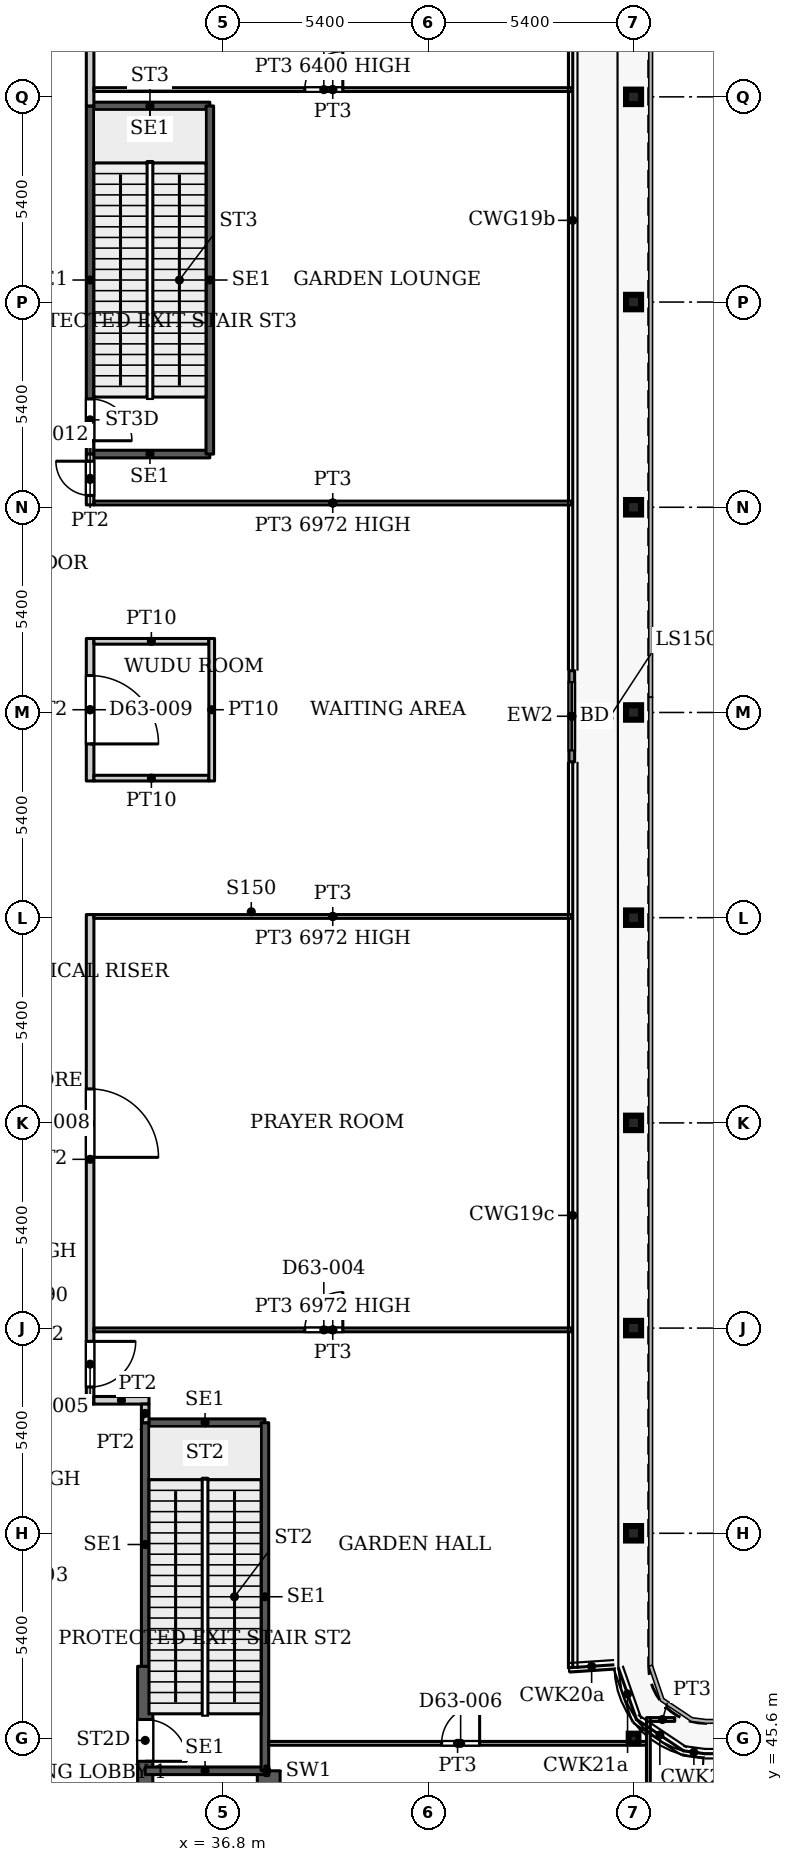
"""IFC4 building model, lengths in metres.
Left out: names, types, materials, properties, quantities, classifications, styles, units other than length and angle.
Written with IfcOpenShell. Run it as: python <this file> out.ifc"""

import sys

from ifc_helpers import new_model, si_unit, direction, frame, frame_2d, origin, origin_2d, place, context, subcontext, project, spatial, rectangle, hollow_rectangle, i_section, extrude, source, transform, mapped, element, fill, save


model = new_model("IFC4")
c1 = context("Model", 3, precision=1e-05, world=origin(), true_north=direction((0.0, 1.0)))
c2 = subcontext(c1, "Body", "Model", "MODEL_VIEW")
j1 = project(units=[si_unit("LENGTHUNIT", "METRE"), si_unit("PLANEANGLEUNIT", "RADIAN")], contexts=[c1])
p1 = place(None, origin())
s1 = spatial("IfcSite", under=j1, at=p1, CompositionType="ELEMENT")
p2 = place(p1, origin())
s2 = spatial("IfcBuilding", under=s1, at=p2, CompositionType="ELEMENT")
p3 = place(p2, frame((0.0, 0.0, 266.9)))
s3 = spatial("IfcBuildingStorey", under=s2, at=p3, CompositionType="ELEMENT", Elevation=266.9)
for number, where, z_axis, x_axis in (
    (1, (47.6, 51.0, 0.0), (0.0, 0.0, 1.0), (1.0, 0.0, 0.0)),
    (2, (47.6, 56.4, 0.0), (0.0, 0.0, 1.0), (1.0, 0.0, 0.0)),
    (3, (47.6, 61.8, 0.0), (0.0, 0.0, 1.0), (1.0, 0.0, 0.0)),
    (4, (47.6, 67.2, 0.0), (0.0, 0.0, 1.0), (1.0, 0.0, 0.0)),
    (5, (47.6, 72.6, 0.0), (0.0, 0.0, 1.0), (1.0, 0.0, 0.0)),
    (6, (47.6, 78.0, 0.0), (0.0, 0.0, 1.0), (1.0, 0.0, 0.0)),
    (7, (47.6, 83.4, 0.0), (0.0, 0.0, 1.0), (1.0, 0.0, 0.0)),
    (8, (47.6, 88.8, 0.0), (0.0, 0.0, 1.0), (1.0, 0.0, 0.0)),
):
    element("IfcColumn", number, at=place(p3, frame(where, z_axis=z_axis, x_axis=x_axis)), inside=s3, PredefinedType="COLUMN", context=c2, shape_type="SweptSolid", body=[
        extrude(i_section(OverallWidth=0.395, OverallDepth=0.38, WebThickness=0.019, FlangeThickness=0.03, FilletRadius=0.011, at=origin_2d()), origin(), (0.0, 0.0, 1.0), 7.8),
    ])
p4 = place(p3, frame((47.6, 45.6, 0.0), z_axis=(0.0, 0.0, 1.0), x_axis=(1.0, 0.0, 0.0)))
e9 = element("IfcColumn", 9, at=p4, inside=s3, PredefinedType="COLUMN", context=c2, shape_type="SweptSolid", body=[
    extrude(hollow_rectangle(XDim=0.254, YDim=0.254, WallThickness=0.013, InnerFilletRadius=0.013, OuterFilletRadius=0.025, at=origin_2d()), origin(), (0.0, 0.0, 1.0), 7.8),
])
p5 = place(p3, frame((34.75, 29.05, 0.0), z_axis=(0.0, 0.0, 1.0), x_axis=(0.0, 1.0, 0.0)))
e10 = element("IfcWall", 10, at=p5, inside=s3, PredefinedType="SHEAR", context=c2, shape_type="SweptSolid", body=[
    extrude(rectangle(XDim=18.45, YDim=0.4, at=frame_2d((9.225, 0.0))), origin(), (0.0, 0.0, 1.0), 7.8),
])
p6 = place(p5, frame((8.025, 0.0, 0.0)))
e11 = element("IfcOpeningElement", 11, at=p6, cuts=e10, PredefinedType="OPENING", context=c2, shape_type="SweptSolid", body=[
    extrude(rectangle(XDim=1.1, YDim=2.2, at=frame_2d((0.55, 1.1))), frame((0.0, 0.21, 0.0), z_axis=(0.0, -1.0, 0.0), x_axis=(1.0, 0.0, 0.0)), (0.0, 0.0, 1.0), 0.42),
])
p7 = place(p5, frame((10.875, 0.0, 0.0)))
e12 = element("IfcOpeningElement", 12, at=p7, cuts=e10, PredefinedType="OPENING", context=c2, shape_type="SweptSolid", body=[
    extrude(rectangle(XDim=1.1, YDim=2.2, at=frame_2d((0.55, 1.1))), frame((0.0, 0.21, 0.0), z_axis=(0.0, -1.0, 0.0), x_axis=(1.0, 0.0, 0.0)), (0.0, 0.0, 1.0), 0.42),
])
p8 = place(p5, frame((13.725, 0.0, 0.0)))
e13 = element("IfcOpeningElement", 13, at=p8, cuts=e10, PredefinedType="OPENING", context=c2, shape_type="SweptSolid", body=[
    extrude(rectangle(XDim=1.1, YDim=2.2, at=frame_2d((0.55, 1.1))), frame((0.0, 0.21, 0.0), z_axis=(0.0, -1.0, 0.0), x_axis=(1.0, 0.0, 0.0)), (0.0, 0.0, 1.0), 0.42),
])
p9 = place(p5, frame((15.95, 0.0, 0.0)))
e14 = element("IfcOpeningElement", 14, at=p9, cuts=e10, PredefinedType="OPENING", context=c2, shape_type="SweptSolid", body=[
    extrude(rectangle(XDim=1.1, YDim=2.2, at=frame_2d((0.55, 1.1))), frame((0.0, 0.21, 0.0), z_axis=(0.0, -1.0, 0.0), x_axis=(1.0, 0.0, 0.0)), (0.0, 0.0, 1.0), 0.42),
])
p10 = place(p3, frame((38.0, 36.2, 0.0), z_axis=(0.0, 0.0, 1.0), x_axis=(0.0, 1.0, 0.0)))
e15 = element("IfcWall", 15, at=p10, inside=s3, PredefinedType="SHEAR", context=c2, shape_type="SweptSolid", body=[
    extrude(rectangle(XDim=8.55, YDim=0.6, at=frame_2d((4.275, 0.0))), origin(), (0.0, 0.0, 1.0), 7.8),
])
p11 = place(p3, frame((45.975, 73.7, 0.0), z_axis=(0.0, 0.0, 1.0), x_axis=(0.0, -1.0, 0.0)))
e16 = element("IfcWall", 16, at=p11, inside=s3, PredefinedType="SOLIDWALL", context=c2, shape_type="SweptSolid", body=[
    extrude(rectangle(XDim=2.4, YDim=0.15, at=frame_2d((1.2, 0.0))), origin(), (0.0, 0.0, 1.0), 7.65),
])
p12 = place(p11, frame((0.3, 0.0, 0.0)))
e17 = element("IfcOpeningElement", 17, at=p12, cuts=e16, PredefinedType="OPENING", context=c2, shape_type="SweptSolid", body=[
    extrude(rectangle(XDim=1.8, YDim=2.4, at=frame_2d((0.9, 1.2))), frame((0.0, 0.085, 0.0), z_axis=(0.0, -1.0, 0.0), x_axis=(1.0, 0.0, 0.0)), (0.0, 0.0, 1.0), 0.17),
])
for number, where, z_axis, x_axis in (
    (18, (34.75, 44.75, 0.0), (0.0, 0.0, 1.0), (1.0, 0.0, 0.0)),
    (19, (34.75, 53.91, 0.0), (0.0, 0.0, 1.0), (1.0, 0.0, 0.0)),
):
    element("IfcWall", number, at=place(p3, frame(where, z_axis=z_axis, x_axis=x_axis)), inside=s3, PredefinedType="SHEAR", context=c2, shape_type="SweptSolid", body=[
        extrude(rectangle(XDim=3.15, YDim=0.2, at=frame_2d((1.575, 0.0))), origin(), (0.0, 0.0, 1.0), 7.8),
    ])
p13 = place(p3, frame((34.75, 47.5, 0.0), z_axis=(0.0, 0.0, 1.0), x_axis=(0.0, 1.0, 0.0)))
e20 = element("IfcWall", 20, at=p13, inside=s3, PredefinedType="SHEAR", context=c2, shape_type="SweptSolid", body=[
    extrude(rectangle(XDim=6.41, YDim=0.2, at=frame_2d((3.205, 0.0))), origin(), (0.0, 0.0, 1.0), 7.8),
])
p14 = place(p3, frame((37.9, 44.75, 0.0), z_axis=(0.0, 0.0, 1.0), x_axis=(0.0, 1.0, 0.0)))
e21 = element("IfcWall", 21, at=p14, inside=s3, PredefinedType="SHEAR", context=c2, shape_type="SweptSolid", body=[
    extrude(rectangle(XDim=9.16, YDim=0.2, at=frame_2d((4.58, 0.0))), origin(), (0.0, 0.0, 1.0), 7.8),
])
for number, where, z_axis, x_axis in (
    (22, (33.3, 79.4, 0.0), (0.0, 0.0, 1.0), (1.0, 0.0, 0.0)),
    (23, (33.3, 88.56, 0.0), (0.0, 0.0, 1.0), (1.0, 0.0, 0.0)),
):
    element("IfcWall", number, at=place(p3, frame(where, z_axis=z_axis, x_axis=x_axis)), inside=s3, PredefinedType="SHEAR", context=c2, shape_type="SweptSolid", body=[
        extrude(rectangle(XDim=3.15, YDim=0.2, at=frame_2d((1.575, 0.0))), origin(), (0.0, 0.0, 1.0), 7.8),
    ])
p15 = place(p3, frame((33.3, 79.4, 0.0), z_axis=(0.0, 0.0, 1.0), x_axis=(0.0, 1.0, 0.0)))
e24 = element("IfcWall", 24, at=p15, inside=s3, PredefinedType="SHEAR", context=c2, shape_type="SweptSolid", body=[
    extrude(rectangle(XDim=9.16, YDim=0.2, at=frame_2d((4.58, 0.0))), origin(), (0.0, 0.0, 1.0), 7.8),
])
p16 = place(p15, frame((0.35, 0.0, 0.0)))
e25 = element("IfcOpeningElement", 25, at=p16, cuts=e24, PredefinedType="OPENING", context=c2, shape_type="SweptSolid", body=[
    extrude(rectangle(XDim=1.1, YDim=2.2, at=frame_2d((0.55, 1.1))), frame((0.0, 0.11, 0.0), z_axis=(0.0, -1.0, 0.0), x_axis=(1.0, 0.0, 0.0)), (0.0, 0.0, 1.0), 0.22),
])
p17 = place(p3, frame((36.45, 79.4, 0.0), z_axis=(0.0, 0.0, 1.0), x_axis=(0.0, 1.0, 0.0)))
e26 = element("IfcWall", 26, at=p17, inside=s3, PredefinedType="SHEAR", context=c2, shape_type="SweptSolid", body=[
    extrude(rectangle(XDim=9.16, YDim=0.2, at=frame_2d((4.58, 0.0))), origin(), (0.0, 0.0, 1.0), 7.8),
])
p18 = place(p3, frame((37.9, 44.75, 0.0), z_axis=(0.0, 0.0, 1.0), x_axis=(1.0, 0.0, 0.0)))
e27 = element("IfcWall", 27, at=p18, inside=s3, PredefinedType="PARTITIONING", context=c2, shape_type="SweptSolid", body=[
    extrude(rectangle(XDim=0.1, YDim=0.25, at=frame_2d((0.05, 0.0))), origin(), (0.0, 0.0, 1.0), 7.8),
])
p19 = place(p3, frame((33.3, 54.4, 0.0), z_axis=(0.0, 0.0, 1.0), x_axis=(0.0, 1.0, 0.0)))
e28 = element("IfcWall", 28, at=p19, inside=s3, PredefinedType="PARTITIONING", context=c2, shape_type="SweptSolid", body=[
    extrude(rectangle(XDim=12.882, YDim=0.2, at=frame_2d((6.441, 0.0))), origin(), (0.0, 0.0, 1.0), 7.5),
])
p20 = place(p19, frame((0.45, 0.0, 0.0)))
e29 = element("IfcOpeningElement", 29, at=p20, cuts=e28, PredefinedType="OPENING", context=c2, shape_type="SweptSolid", body=[
    extrude(rectangle(XDim=1.2, YDim=2.1, at=frame_2d((0.6, 1.05))), frame((0.0, 0.11, 0.0), z_axis=(0.0, -1.0, 0.0), x_axis=(1.0, 0.0, 0.0)), (0.0, 0.0, 1.0), 0.22),
])
p21 = place(p19, frame((6.493, 0.0, 0.0)))
e30 = element("IfcOpeningElement", 30, at=p21, cuts=e28, PredefinedType="OPENING", context=c2, shape_type="SweptSolid", body=[
    extrude(rectangle(XDim=1.8, YDim=2.1, at=frame_2d((0.9, 1.05))), frame((0.0, 0.11, 0.0), z_axis=(0.0, -1.0, 0.0), x_axis=(1.0, 0.0, 0.0)), (0.0, 0.0, 1.0), 0.22),
])
p22 = place(p3, frame((33.3, 70.797, 0.0), z_axis=(0.0, 0.0, 1.0), x_axis=(0.0, 1.0, 0.0)))
e31 = element("IfcWall", 31, at=p22, inside=s3, PredefinedType="PARTITIONING", context=c2, shape_type="SweptSolid", body=[
    extrude(rectangle(XDim=3.75, YDim=0.2, at=frame_2d((1.875, 0.0))), origin(), (0.0, 0.0, 1.0), 7.5),
])
p23 = place(p22, frame((0.975, 0.0, 0.0)))
e32 = element("IfcOpeningElement", 32, at=p23, cuts=e31, PredefinedType="OPENING", context=c2, shape_type="SweptSolid", body=[
    extrude(rectangle(XDim=1.8, YDim=2.1, at=frame_2d((0.9, 1.05))), frame((0.0, 0.11, 0.0), z_axis=(0.0, -1.0, 0.0), x_axis=(1.0, 0.0, 0.0)), (0.0, 0.0, 1.0), 0.22),
])
p24 = place(p3, frame((33.3, 78.062, 0.0), z_axis=(0.0, 0.0, 1.0), x_axis=(0.0, 1.0, 0.0)))
e33 = element("IfcWall", 33, at=p24, inside=s3, PredefinedType="PARTITIONING", context=c2, shape_type="SweptSolid", body=[
    extrude(rectangle(XDim=1.338, YDim=0.2, at=frame_2d((0.669, 0.0))), origin(), (0.0, 0.0, 1.0), 7.5),
])
p25 = place(p24, frame((0.25, 0.0, 0.0)))
e34 = element("IfcOpeningElement", 34, at=p25, cuts=e33, PredefinedType="OPENING", context=c2, shape_type="SweptSolid", body=[
    extrude(rectangle(XDim=0.9, YDim=2.1, at=frame_2d((0.45, 1.05))), frame((0.0, 0.11, 0.0), z_axis=(0.0, -1.0, 0.0), x_axis=(1.0, 0.0, 0.0)), (0.0, 0.0, 1.0), 0.22),
])
p26 = place(p3, frame((33.3, 88.56, 0.0), z_axis=(0.0, 0.0, 1.0), x_axis=(0.0, 1.0, 0.0)))
e35 = element("IfcWall", 35, at=p26, inside=s3, PredefinedType="PARTITIONING", context=c2, shape_type="SweptSolid", body=[
    extrude(rectangle(XDim=5.54, YDim=0.2, at=frame_2d((2.77, 0.0))), origin(), (0.0, 0.0, 1.0), 7.5),
])
p27 = place(p3, frame((33.4, 54.5, 0.0), z_axis=(0.0, 0.0, 1.0), x_axis=(1.0, 0.0, 0.0)))
e36 = element("IfcWall", 36, at=p27, inside=s3, PredefinedType="PARTITIONING", context=c2, shape_type="SweptSolid", body=[
    extrude(rectangle(XDim=1.45, YDim=0.2, at=frame_2d((0.725, 0.0))), origin(), (0.0, 0.0, 1.0), 7.5),
])
p28 = place(p3, frame((33.4, 56.353, 0.0), z_axis=(0.0, 0.0, 1.0), x_axis=(1.0, 0.0, 0.0)))
e37 = element("IfcWall", 37, at=p28, inside=s3, PredefinedType="PARTITIONING", context=c2, shape_type="SweptSolid", body=[
    extrude(rectangle(XDim=12.57, YDim=0.1, at=frame_2d((6.285, 0.0))), origin(), (0.0, 0.0, 1.0), 6.972),
])
p29 = place(p28, frame((5.55, 0.0, 0.0)))
e38 = element("IfcOpeningElement", 38, at=p29, cuts=e37, PredefinedType="OPENING", context=c2, shape_type="SweptSolid", body=[
    extrude(rectangle(XDim=1.0, YDim=2.1, at=frame_2d((0.5, 1.05))), frame((0.0, 0.06, 0.0), z_axis=(0.0, -1.0, 0.0), x_axis=(1.0, 0.0, 0.0)), (0.0, 0.0, 1.0), 0.12),
])
p30 = place(p3, frame((33.4, 67.232, 0.0), z_axis=(0.0, 0.0, 1.0), x_axis=(1.0, 0.0, 0.0)))
e39 = element("IfcWall", 39, at=p30, inside=s3, PredefinedType="PARTITIONING", context=c2, shape_type="SweptSolid", body=[
    extrude(rectangle(XDim=12.57, YDim=0.1, at=frame_2d((6.285, 0.0))), origin(), (0.0, 0.0, 1.0), 6.972),
])
for number, where, z_axis, x_axis in (
    (40, (33.4, 70.872, 0.0), (0.0, 0.0, 1.0), (1.0, 0.0, 0.0)),
    (41, (33.4, 74.472, 0.0), (0.0, 0.0, 1.0), (1.0, 0.0, 0.0)),
):
    element("IfcWall", number, at=place(p3, frame(where, z_axis=z_axis, x_axis=x_axis)), inside=s3, PredefinedType="PARTITIONING", context=c2, shape_type="SweptSolid", body=[
        extrude(rectangle(XDim=3.025, YDim=0.15, at=frame_2d((1.513, 0.0))), origin(), (0.0, 0.0, 1.0), 7.5),
    ])
p31 = place(p3, frame((33.4, 78.112, 0.0), z_axis=(0.0, 0.0, 1.0), x_axis=(1.0, 0.0, 0.0)))
e42 = element("IfcWall", 42, at=p31, inside=s3, PredefinedType="PARTITIONING", context=c2, shape_type="SweptSolid", body=[
    extrude(rectangle(XDim=12.57, YDim=0.1, at=frame_2d((6.285, 0.0))), origin(), (0.0, 0.0, 1.0), 6.972),
])
p32 = place(p3, frame((33.4, 88.991, 0.0), z_axis=(0.0, 0.0, 1.0), x_axis=(1.0, 0.0, 0.0)))
e43 = element("IfcWall", 43, at=p32, inside=s3, PredefinedType="PARTITIONING", context=c2, shape_type="SweptSolid", body=[
    extrude(rectangle(XDim=12.57, YDim=0.1, at=frame_2d((6.285, 0.0))), origin(), (0.0, 0.0, 1.0), 6.4),
])
p33 = place(p32, frame((5.55, 0.0, 0.0)))
e44 = element("IfcOpeningElement", 44, at=p33, cuts=e43, PredefinedType="OPENING", context=c2, shape_type="SweptSolid", body=[
    extrude(rectangle(XDim=1.0, YDim=2.1, at=frame_2d((0.5, 1.05))), frame((0.0, 0.06, 0.0), z_axis=(0.0, -1.0, 0.0), x_axis=(1.0, 0.0, 0.0)), (0.0, 0.0, 1.0), 0.12),
])
p34 = place(p3, frame((34.75, 53.91, 0.0), z_axis=(0.0, 0.0, 1.0), x_axis=(0.0, 1.0, 0.0)))
e45 = element("IfcWall", 45, at=p34, inside=s3, PredefinedType="PARTITIONING", context=c2, shape_type="SweptSolid", body=[
    extrude(rectangle(XDim=0.49, YDim=0.2, at=frame_2d((0.245, 0.0))), origin(), (0.0, 0.0, 1.0), 7.5),
])
p35 = place(p3, frame((36.5, 70.797, 0.0), z_axis=(0.0, 0.0, 1.0), x_axis=(0.0, 1.0, 0.0)))
e46 = element("IfcWall", 46, at=p35, inside=s3, PredefinedType="PARTITIONING", context=c2, shape_type="SweptSolid", body=[
    extrude(rectangle(XDim=3.75, YDim=0.15, at=frame_2d((1.875, 0.0))), origin(), (0.0, 0.0, 1.0), 7.5),
])
p36 = place(p3, frame((37.999, 45.473, 0.0), z_axis=(0.0, 0.0, 1.0), x_axis=(1.0, 0.0, 0.0)))
e47 = element("IfcWall", 47, at=p36, inside=s3, PredefinedType="PARTITIONING", context=c2, shape_type="SweptSolid", body=[
    extrude(rectangle(XDim=9.941, YDim=0.1, at=frame_2d((4.97, 0.0))), origin(), (0.0, 0.0, 1.0), 7.5),
])
p37 = place(p36, frame((4.551, 0.0, 0.0)))
e48 = element("IfcOpeningElement", 48, at=p37, cuts=e47, PredefinedType="OPENING", context=c2, shape_type="SweptSolid", body=[
    extrude(rectangle(XDim=1.0, YDim=2.1, at=frame_2d((0.5, 1.05))), frame((0.0, 0.06, 0.0), z_axis=(0.0, -1.0, 0.0), x_axis=(1.0, 0.0, 0.0)), (0.0, 0.0, 1.0), 0.12),
])
p38 = place(p3, frame((47.99, 39.449, 0.0), z_axis=(0.0, 0.0, 1.0), x_axis=(0.0, 1.0, 0.0)))
e49 = element("IfcWall", 49, at=p38, inside=s3, PredefinedType="PARTITIONING", context=c2, shape_type="SweptSolid", body=[
    extrude(rectangle(XDim=6.701, YDim=0.1, at=frame_2d((3.351, 0.0))), origin(), (0.0, 0.0, 1.0), 7.5),
])
p39 = place(p38, frame((2.374, 0.0, 0.0)))
e50 = element("IfcOpeningElement", 50, at=p39, cuts=e49, PredefinedType="OPENING", context=c2, shape_type="SweptSolid", body=[
    extrude(rectangle(XDim=1.0, YDim=2.1, at=frame_2d((0.5, 1.05))), frame((0.0, 0.06, 0.0), z_axis=(0.0, -1.0, 0.0), x_axis=(1.0, 0.0, 0.0)), (0.0, 0.0, 1.0), 0.12),
])
p40 = place(p3, frame((48.04, 46.1, 0.0), z_axis=(0.0, 0.0, 1.0), x_axis=(1.0, 0.0, 0.0)))
e51 = element("IfcWall", 51, at=p40, inside=s3, PredefinedType="PARTITIONING", context=c2, shape_type="SweptSolid", body=[
    extrude(rectangle(XDim=0.644, YDim=0.1, at=frame_2d((0.322, 0.0))), origin(), (0.0, 0.0, 1.0), 7.5),
])
m1 = source(origin(), c2, "Body", "SweptSolid", [
    extrude(rectangle(XDim=1.8, YDim=2.4, at=frame_2d((0.9, 1.2))), frame((0.0, 0.025, 0.0), z_axis=(0.0, -1.0, 0.0), x_axis=(1.0, 0.0, 0.0)), (0.0, 0.0, 1.0), 0.05),
])
p41 = place(p12, origin())
e52 = element("IfcDoor", 52, at=p41, inside=s3, OperationType="SLIDING_TO_LEFT", PredefinedType="DOOR", context=c2, shape_type="MappedRepresentation", body=[
    mapped(m1, transform((0.0, 0.0, 0.0), x_axis=(1.0, 0.0, 0.0), y_axis=(0.0, 1.0, 0.0), z_axis=(0.0, 0.0, 1.0), scale=1.0)),
])
fill(e17, e52)
m2 = source(origin(), c2, "Body", "SweptSolid", [
    extrude(rectangle(XDim=1.1, YDim=2.2, at=frame_2d((0.55, 1.1))), frame((0.0, 0.025, 0.0), z_axis=(0.0, -1.0, 0.0), x_axis=(1.0, 0.0, 0.0)), (0.0, 0.0, 1.0), 0.05),
])
p42 = place(p9, origin())
e53 = element("IfcDoor", 53, at=p42, inside=s3, OperationType="SINGLE_SWING_RIGHT", PredefinedType="DOOR", context=c2, shape_type="MappedRepresentation", body=[
    mapped(m2, transform((0.0, 0.0, 0.0), x_axis=(1.0, 0.0, 0.0), y_axis=(0.0, 1.0, 0.0), z_axis=(0.0, 0.0, 1.0), scale=1.0)),
])
fill(e14, e53)
p43 = place(p16, origin())
e54 = element("IfcDoor", 54, at=p43, inside=s3, OperationType="SINGLE_SWING_RIGHT", PredefinedType="DOOR", context=c2, shape_type="MappedRepresentation", body=[
    mapped(m2, transform((0.0, 0.0, 0.0), x_axis=(1.0, 0.0, 0.0), y_axis=(0.0, 1.0, 0.0), z_axis=(0.0, 0.0, 1.0), scale=1.0)),
])
fill(e25, e54)
m3 = source(origin(), c2, "Body", "SweptSolid", [
    extrude(rectangle(XDim=1.0, YDim=2.1, at=frame_2d((0.5, 1.05))), frame((0.0, 0.025, 0.0), z_axis=(0.0, -1.0, 0.0), x_axis=(1.0, 0.0, 0.0)), (0.0, 0.0, 1.0), 0.05),
])
p44 = place(p29, origin())
e55 = element("IfcDoor", 55, at=p44, inside=s3, OperationType="SINGLE_SWING_LEFT", PredefinedType="DOOR", context=c2, shape_type="MappedRepresentation", body=[
    mapped(m3, transform((0.0, 0.0, 0.0), x_axis=(1.0, 0.0, 0.0), y_axis=(0.0, 1.0, 0.0), z_axis=(0.0, 0.0, 1.0), scale=1.0)),
])
fill(e38, e55)
m4 = source(origin(), c2, "Body", "SweptSolid", [
    extrude(rectangle(XDim=1.2, YDim=2.1, at=frame_2d((0.6, 1.05))), frame((0.0, 0.025, 0.0), z_axis=(0.0, -1.0, 0.0), x_axis=(1.0, 0.0, 0.0)), (0.0, 0.0, 1.0), 0.05),
])
p45 = place(p20, origin())
e56 = element("IfcDoor", 56, at=p45, inside=s3, OperationType="SINGLE_SWING_RIGHT", PredefinedType="DOOR", context=c2, shape_type="MappedRepresentation", body=[
    mapped(m4, transform((0.0, 0.0, 0.0), x_axis=(1.0, 0.0, 0.0), y_axis=(0.0, 1.0, 0.0), z_axis=(0.0, 0.0, 1.0), scale=1.0)),
])
fill(e29, e56)
p46 = place(p37, origin())
e57 = element("IfcDoor", 57, at=p46, inside=s3, OperationType="SINGLE_SWING_LEFT", PredefinedType="DOOR", context=c2, shape_type="MappedRepresentation", body=[
    mapped(m3, transform((0.0, 0.0, 0.0), x_axis=(1.0, 0.0, 0.0), y_axis=(0.0, 1.0, 0.0), z_axis=(0.0, 0.0, 1.0), scale=1.0)),
])
fill(e48, e57)
m5 = source(origin(), c2, "Body", "SweptSolid", [
    extrude(rectangle(XDim=1.8, YDim=2.1, at=frame_2d((0.9, 1.05))), frame((0.0, 0.025, 0.0), z_axis=(0.0, -1.0, 0.0), x_axis=(1.0, 0.0, 0.0)), (0.0, 0.0, 1.0), 0.05),
])
p47 = place(p21, origin())
e58 = element("IfcDoor", 58, at=p47, inside=s3, OperationType="DOUBLE_DOOR_SINGLE_SWING", PredefinedType="DOOR", context=c2, shape_type="MappedRepresentation", body=[
    mapped(m5, transform((0.0, 0.0, 0.0), x_axis=(1.0, 0.0, 0.0), y_axis=(0.0, 1.0, 0.0), z_axis=(0.0, 0.0, 1.0), scale=1.0)),
])
fill(e30, e58)
p48 = place(p23, origin())
e59 = element("IfcDoor", 59, at=p48, inside=s3, OperationType="DOUBLE_DOOR_SINGLE_SWING", PredefinedType="DOOR", context=c2, shape_type="MappedRepresentation", body=[
    mapped(m5, transform((0.0, 0.0, 0.0), x_axis=(1.0, 0.0, 0.0), y_axis=(0.0, 1.0, 0.0), z_axis=(0.0, 0.0, 1.0), scale=1.0)),
])
fill(e32, e59)
p49 = place(p33, origin())
e60 = element("IfcDoor", 60, at=p49, inside=s3, OperationType="SINGLE_SWING_LEFT", PredefinedType="DOOR", context=c2, shape_type="MappedRepresentation", body=[
    mapped(m3, transform((0.0, 0.0, 0.0), x_axis=(1.0, 0.0, 0.0), y_axis=(0.0, 1.0, 0.0), z_axis=(0.0, 0.0, 1.0), scale=1.0)),
])
fill(e44, e60)
m6 = source(origin(), c2, "Body", "SweptSolid", [
    extrude(rectangle(XDim=0.9, YDim=2.1, at=frame_2d((0.45, 1.05))), frame((0.0, 0.025, 0.0), z_axis=(0.0, -1.0, 0.0), x_axis=(1.0, 0.0, 0.0)), (0.0, 0.0, 1.0), 0.05),
])
p50 = place(p25, origin())
e61 = element("IfcDoor", 61, at=p50, inside=s3, OperationType="SINGLE_SWING_LEFT", PredefinedType="DOOR", context=c2, shape_type="MappedRepresentation", body=[
    mapped(m6, transform((0.0, 0.0, 0.0), x_axis=(1.0, 0.0, 0.0), y_axis=(0.0, 1.0, 0.0), z_axis=(0.0, 0.0, 1.0), scale=1.0)),
])
fill(e34, e61)
save(model, sys.argv[1])
